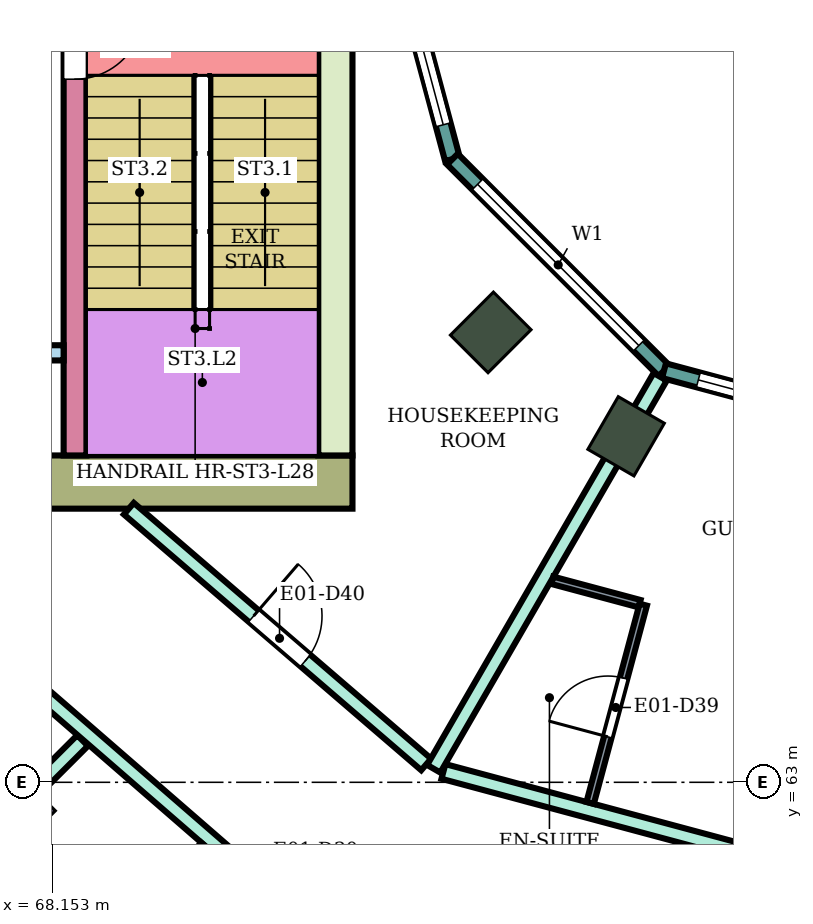
"""IFC4 building model, lengths in metres.
Left out: names, types, materials, properties, quantities, classifications, styles, units other than length and angle.
Written with IfcOpenShell. Run it as: python <this file> out.ifc"""

import sys

from ifc_helpers import new_model, si_unit, direction, frame, frame_2d, origin, origin_2d, place, context, subcontext, project, spatial, rectangle, extrude, element, fill, save


model = new_model("IFC4")
c1 = context("Model", 3, precision=1e-05, world=origin(), true_north=direction((0.0, 1.0)))
c2 = subcontext(c1, "Body", "Model", "MODEL_VIEW")
j1 = project(units=[si_unit("LENGTHUNIT", "METRE"), si_unit("PLANEANGLEUNIT", "RADIAN")], contexts=[c1])
p1 = place(None, origin())
s1 = spatial("IfcSite", under=j1, at=p1, CompositionType="ELEMENT")
p2 = place(p1, origin())
s2 = spatial("IfcBuilding", under=s1, at=p2, CompositionType="ELEMENT")
p3 = place(p2, frame((0.0, 0.0, 122.4)))
s3 = spatial("IfcBuildingStorey", under=s2, at=p3, CompositionType="ELEMENT", Elevation=122.4)
p4 = place(p3, frame((67.555, 62.555, 0.0), z_axis=(0.0, 0.0, 1.0), x_axis=(-0.707106781187, -0.707106781187, 0.0)))
e1 = element("IfcColumn", 1, at=p4, inside=s3, PredefinedType="COLUMN", context=c2, shape_type="SweptSolid", body=[
    extrude(rectangle(XDim=1.0, YDim=0.8, at=origin_2d()), origin(), (0.0, 0.0, 1.0), 3.9),
])
for number, where, z_axis, x_axis in (
    (2, (73.919, 68.919, 0.0), (0.0, 0.0, 1.0), (-0.707, -0.707, 0.0)),
    (3, (75.7, 67.552, 0.0), (0.0, 0.0, 1.0), (-0.5, -0.866, 0.0)),
):
    element("IfcColumn", number, at=place(p3, frame(where, z_axis=z_axis, x_axis=x_axis)), inside=s3, PredefinedType="COLUMN", context=c2, shape_type="SweptSolid", body=[
        extrude(rectangle(XDim=0.8, YDim=0.7, at=origin_2d()), origin(), (0.0, 0.0, 1.0), 3.9),
    ])
p5 = place(p3, frame((72.1, 66.95, 0.0), z_axis=(0.0, 0.0, 1.0), x_axis=(-1.0, 0.0, 0.0)))
e4 = element("IfcWall", 4, at=p5, inside=s3, PredefinedType="SHEAR", context=c2, shape_type="SweptSolid", body=[
    extrude(rectangle(XDim=14.8, YDim=0.7, at=frame_2d((7.4, 0.0))), origin(), (0.0, 0.0, 1.0), 3.58),
])
p6 = place(p5, frame((4.2, 0.0, 0.0)))
e5 = element("IfcOpeningElement", 5, at=p6, cuts=e4, PredefinedType="OPENING", context=c2, shape_type="SweptSolid", body=[
    extrude(rectangle(XDim=2.4, YDim=2.4, at=frame_2d((1.2, 1.2))), frame((0.0, 0.36, 0.0), z_axis=(0.0, -1.0, 0.0), x_axis=(1.0, 0.0, 0.0)), (0.0, 0.0, 1.0), 0.72),
])
p7 = place(p3, frame((71.875, 75.0, 0.0), z_axis=(0.0, 0.0, 1.0), x_axis=(0.0, -1.0, 0.0)))
e6 = element("IfcWall", 6, at=p7, inside=s3, PredefinedType="SHEAR", context=c2, shape_type="SweptSolid", body=[
    extrude(rectangle(XDim=7.7, YDim=0.45, at=frame_2d((3.85, 0.0))), origin(), (0.0, 0.0, 1.0), 3.58),
])
p8 = place(p3, frame((68.45, 75.0, 0.0), z_axis=(0.0, 0.0, 1.0), x_axis=(0.0, -1.0, 0.0)))
e7 = element("IfcWall", 7, at=p8, inside=s3, PredefinedType="SHEAR", context=c2, shape_type="SweptSolid", body=[
    extrude(rectangle(XDim=7.7, YDim=0.3, at=frame_2d((3.85, 0.0))), origin(), (0.0, 0.0, 1.0), 3.58),
])
p9 = place(p8, frame((1.85, 0.0, 0.0)))
e8 = element("IfcOpeningElement", 8, at=p9, cuts=e7, PredefinedType="OPENING", context=c2, shape_type="SweptSolid", body=[
    extrude(rectangle(XDim=0.9, YDim=2.1, at=frame_2d((0.45, 1.05))), frame((0.0, 0.16, 0.0), z_axis=(0.0, -1.0, 0.0), x_axis=(1.0, 0.0, 0.0)), (0.0, 0.0, 1.0), 0.32),
])
p10 = place(p3, frame((68.3, 68.65, 0.0), z_axis=(0.0, 0.0, 1.0), x_axis=(-1.0, 0.0, 0.0)))
e9 = element("IfcWall", 9, at=p10, inside=s3, PredefinedType="SHEAR", context=c2, shape_type="SweptSolid", body=[
    extrude(rectangle(XDim=4.5, YDim=0.2, at=frame_2d((2.25, 0.0))), origin(), (0.0, 0.0, 1.0), 3.58),
])
p11 = place(p3, frame((72.396, 75.0, 0.0), z_axis=(0.0, 0.0, 1.0), x_axis=(0.258789828301, -0.965933654434, 0.0)))
e10 = element("IfcWall", 10, at=p11, inside=s3, PredefinedType="NOTDEFINED", context=c2, shape_type="SweptSolid", body=[
    extrude(rectangle(XDim=3.936, YDim=0.2, at=frame_2d((1.968, 0.0))), origin(), (0.0, 0.0, 1.0), 3.9),
])
p12 = place(p11, frame((0.468, 0.0, 0.9)))
e11 = element("IfcOpeningElement", 11, at=p12, cuts=e10, PredefinedType="OPENING", context=c2, shape_type="SweptSolid", body=[
    extrude(rectangle(XDim=3.0, YDim=2.3, at=frame_2d((1.5, 1.15))), frame((0.0, 0.11, 0.0), z_axis=(0.0, -1.0, 0.0), x_axis=(1.0, 0.0, 0.0)), (0.0, 0.0, 1.0), 0.22),
])
p13 = place(p3, frame((73.415, 71.198, 0.0), z_axis=(0.0, 0.0, 1.0), x_axis=(0.707106781187, -0.707106781187, 0.0)))
e12 = element("IfcWall", 12, at=p13, inside=s3, PredefinedType="NOTDEFINED", context=c2, shape_type="SweptSolid", body=[
    extrude(rectangle(XDim=3.936, YDim=0.2, at=frame_2d((1.968, 0.0))), origin(), (0.0, 0.0, 1.0), 3.9),
])
p14 = place(p13, frame((0.468, 0.0, 0.9)))
e13 = element("IfcOpeningElement", 13, at=p14, cuts=e12, PredefinedType="OPENING", context=c2, shape_type="SweptSolid", body=[
    extrude(rectangle(XDim=3.0, YDim=2.3, at=frame_2d((1.5, 1.15))), frame((0.0, 0.11, 0.0), z_axis=(0.0, -1.0, 0.0), x_axis=(1.0, 0.0, 0.0)), (0.0, 0.0, 1.0), 0.22),
])
p15 = place(p3, frame((76.198, 68.415, 0.0), z_axis=(0.0, 0.0, 1.0), x_axis=(0.965933654434, -0.258789828301, 0.0)))
e14 = element("IfcWall", 14, at=p15, inside=s3, PredefinedType="NOTDEFINED", context=c2, shape_type="SweptSolid", body=[
    extrude(rectangle(XDim=3.936, YDim=0.2, at=frame_2d((1.968, 0.0))), origin(), (0.0, 0.0, 1.0), 3.9),
])
p16 = place(p15, frame((0.468, 0.0, 0.9)))
e15 = element("IfcOpeningElement", 15, at=p16, cuts=e14, PredefinedType="OPENING", context=c2, shape_type="SweptSolid", body=[
    extrude(rectangle(XDim=3.0, YDim=2.3, at=frame_2d((1.5, 1.15))), frame((0.0, 0.11, 0.0), z_axis=(0.0, -1.0, 0.0), x_axis=(1.0, 0.0, 0.0)), (0.0, 0.0, 1.0), 0.22),
])
p17 = place(p3, frame((63.596, 58.596, 0.0), z_axis=(0.0, 0.0, 1.0), x_axis=(0.707106781187, 0.707106781187, 0.0)))
e16 = element("IfcWall", 16, at=p17, inside=s3, PredefinedType="PARTITIONING", context=c2, shape_type="SweptSolid", body=[
    extrude(rectangle(XDim=7.005, YDim=0.2, at=frame_2d((3.503, 0.0))), origin(), (0.0, 0.0, 1.0), 3.45),
])
p18 = place(p3, frame((67.081, 64.971, 0.0), z_axis=(0.0, 0.0, 1.0), x_axis=(0.755031061605, -0.65568902386, 0.0)))
e17 = element("IfcWall", 17, at=p18, inside=s3, PredefinedType="PARTITIONING", context=c2, shape_type="SweptSolid", body=[
    extrude(rectangle(XDim=6.186, YDim=0.2, at=frame_2d((3.093, 0.0))), origin(), (0.0, 0.0, 1.0), 3.45),
])
p19 = place(p18, frame((4.755, 0.0, 0.0)))
e18 = element("IfcOpeningElement", 18, at=p19, cuts=e17, PredefinedType="OPENING", context=c2, shape_type="SweptSolid", body=[
    extrude(rectangle(XDim=1.0, YDim=2.1, at=frame_2d((0.5, 1.05))), frame((0.0, 0.11, 0.0), z_axis=(0.0, -1.0, 0.0), x_axis=(1.0, 0.0, 0.0)), (0.0, 0.0, 1.0), 0.22),
])
p20 = place(p3, frame((69.158, 66.6, 0.0), z_axis=(0.0, 0.0, 1.0), x_axis=(0.758063092745, -0.652181222835, 0.0)))
e19 = element("IfcWall", 19, at=p20, inside=s3, PredefinedType="PARTITIONING", context=c2, shape_type="SweptSolid", body=[
    extrude(rectangle(XDim=5.16, YDim=0.2, at=frame_2d((2.58, 0.0))), origin(), (0.0, 0.0, 1.0), 3.45),
])
p21 = place(p20, frame((2.165, 0.0, 0.0)))
e20 = element("IfcOpeningElement", 20, at=p21, cuts=e19, PredefinedType="OPENING", context=c2, shape_type="SweptSolid", body=[
    extrude(rectangle(XDim=0.9, YDim=2.1, at=frame_2d((0.45, 1.05))), frame((0.0, 0.11, 0.0), z_axis=(0.0, -1.0, 0.0), x_axis=(1.0, 0.0, 0.0)), (0.0, 0.0, 1.0), 0.22),
])
p22 = place(p3, frame((73.297, 63.143, 0.0), z_axis=(0.0, 0.0, 1.0), x_axis=(0.965859030528, -0.25906820173, 0.0)))
e21 = element("IfcWall", 21, at=p22, inside=s3, PredefinedType="PARTITIONING", context=c2, shape_type="SweptSolid", body=[
    extrude(rectangle(XDim=6.81, YDim=0.2, at=frame_2d((3.405, 0.0))), origin(), (0.0, 0.0, 1.0), 3.45),
])
p23 = place(p22, frame((5.39, 0.0, 0.0)))
e22 = element("IfcOpeningElement", 22, at=p23, cuts=e21, PredefinedType="OPENING", context=c2, shape_type="SweptSolid", body=[
    extrude(rectangle(XDim=1.0, YDim=2.1, at=frame_2d((0.5, 1.05))), frame((0.0, 0.11, 0.0), z_axis=(0.0, -1.0, 0.0), x_axis=(1.0, 0.0, 0.0)), (0.0, 0.0, 1.0), 0.22),
])
p24 = place(p3, frame((73.169, 63.178, 0.0), z_axis=(0.0, 0.0, 1.0), x_axis=(0.500239348149, 0.865887171959, 0.0)))
e23 = element("IfcWall", 23, at=p24, inside=s3, PredefinedType="PARTITIONING", context=c2, shape_type="SweptSolid", body=[
    extrude(rectangle(XDim=5.955, YDim=0.2, at=frame_2d((2.978, 0.0))), origin(), (0.0, 0.0, 1.0), 3.45),
])
p25 = place(p3, frame((65.209, 62.875, 0.0), z_axis=(0.0, 0.0, 1.0), x_axis=(0.757930378138, -0.652335451969, 0.0)))
e24 = element("IfcWall", 24, at=p25, inside=s3, PredefinedType="PARTITIONING", context=c2, shape_type="SweptSolid", body=[
    extrude(rectangle(XDim=4.15, YDim=0.1, at=frame_2d((2.075, 0.0))), origin(), (0.0, 0.0, 1.0), 3.45),
])
p26 = place(p3, frame((68.393, 60.135, 0.0), z_axis=(0.0, 0.0, 1.0), x_axis=(0.652061182569, 0.758166349944, 0.0)))
e25 = element("IfcWall", 25, at=p26, inside=s3, PredefinedType="PARTITIONING", context=c2, shape_type="SweptSolid", body=[
    extrude(rectangle(XDim=2.69, YDim=0.1, at=frame_2d((1.345, 0.0))), origin(), (0.0, 0.0, 1.0), 3.45),
])
p27 = place(p26, frame((1.0, 0.0, 0.0)))
e26 = element("IfcOpeningElement", 26, at=p27, cuts=e25, PredefinedType="OPENING", context=c2, shape_type="SweptSolid", body=[
    extrude(rectangle(XDim=0.8, YDim=2.1, at=frame_2d((0.4, 1.05))), frame((0.0, 0.06, 0.0), z_axis=(0.0, -1.0, 0.0), x_axis=(1.0, 0.0, 0.0)), (0.0, 0.0, 1.0), 0.12),
])
p28 = place(p3, frame((74.729, 65.657, 0.0), z_axis=(0.0, 0.0, 1.0), x_axis=(0.965948051503, -0.258736085224, 0.0)))
e27 = element("IfcWall", 27, at=p28, inside=s3, PredefinedType="PARTITIONING", context=c2, shape_type="SweptSolid", body=[
    extrude(rectangle(XDim=1.189, YDim=0.1, at=frame_2d((0.594, 0.0))), origin(), (0.0, 0.0, 1.0), 3.45),
])
p29 = place(p3, frame((75.227, 62.729, 0.0), z_axis=(0.0, 0.0, 1.0), x_axis=(0.258945475746, 0.965891940432, 0.0)))
e28 = element("IfcWall", 28, at=p29, inside=s3, PredefinedType="PARTITIONING", context=c2, shape_type="SweptSolid", body=[
    extrude(rectangle(XDim=2.7, YDim=0.1, at=frame_2d((1.35, 0.0))), origin(), (0.0, 0.0, 1.0), 3.45),
])
p30 = place(p29, frame((0.9, 0.0, 0.0)))
e29 = element("IfcOpeningElement", 29, at=p30, cuts=e28, PredefinedType="OPENING", context=c2, shape_type="SweptSolid", body=[
    extrude(rectangle(XDim=0.8, YDim=2.1, at=frame_2d((0.4, 1.05))), frame((0.0, 0.06, 0.0), z_axis=(0.0, -1.0, 0.0), x_axis=(1.0, 0.0, 0.0)), (0.0, 0.0, 1.0), 0.12),
])
p31 = place(p12, origin())
e30 = element("IfcWindow", 30, at=p31, inside=s3, PartitioningType="SINGLE_PANEL", PredefinedType="WINDOW", context=c2, shape_type="SweptSolid", body=[
    extrude(rectangle(XDim=3.0, YDim=2.3, at=frame_2d((1.5, 1.15))), frame((0.0, 0.03, 0.0), z_axis=(0.0, -1.0, 0.0), x_axis=(1.0, 0.0, 0.0)), (0.0, 0.0, 1.0), 0.06),
])
fill(e11, e30)
p32 = place(p14, origin())
e31 = element("IfcWindow", 31, at=p32, inside=s3, PartitioningType="SINGLE_PANEL", PredefinedType="WINDOW", context=c2, shape_type="SweptSolid", body=[
    extrude(rectangle(XDim=3.0, YDim=2.3, at=frame_2d((1.5, 1.15))), frame((0.0, 0.03, 0.0), z_axis=(0.0, -1.0, 0.0), x_axis=(1.0, 0.0, 0.0)), (0.0, 0.0, 1.0), 0.06),
])
fill(e13, e31)
p33 = place(p16, origin())
e32 = element("IfcWindow", 32, at=p33, inside=s3, PartitioningType="SINGLE_PANEL", PredefinedType="WINDOW", context=c2, shape_type="SweptSolid", body=[
    extrude(rectangle(XDim=3.0, YDim=2.3, at=frame_2d((1.5, 1.15))), frame((0.0, 0.03, 0.0), z_axis=(0.0, -1.0, 0.0), x_axis=(1.0, 0.0, 0.0)), (0.0, 0.0, 1.0), 0.06),
])
fill(e15, e32)
p34 = place(p30, origin())
e33 = element("IfcDoor", 33, at=p34, inside=s3, OperationType="SINGLE_SWING_LEFT", PredefinedType="DOOR", context=c2, shape_type="SweptSolid", body=[
    extrude(rectangle(XDim=0.8, YDim=2.1, at=frame_2d((0.4, 1.05))), frame((0.0, 0.025, 0.0), z_axis=(0.0, -1.0, 0.0), x_axis=(1.0, 0.0, 0.0)), (0.0, 0.0, 1.0), 0.05),
])
fill(e29, e33)
p35 = place(p21, origin())
e34 = element("IfcDoor", 34, at=p35, inside=s3, OperationType="SINGLE_SWING_LEFT", PredefinedType="DOOR", context=c2, shape_type="SweptSolid", body=[
    extrude(rectangle(XDim=0.9, YDim=2.1, at=frame_2d((0.45, 1.05))), frame((0.0, 0.025, 0.0), z_axis=(0.0, -1.0, 0.0), x_axis=(1.0, 0.0, 0.0)), (0.0, 0.0, 1.0), 0.05),
])
fill(e20, e34)
p36 = place(p9, origin())
e35 = element("IfcDoor", 35, at=p36, inside=s3, OperationType="SINGLE_SWING_LEFT", PredefinedType="DOOR", context=c2, shape_type="SweptSolid", body=[
    extrude(rectangle(XDim=0.9, YDim=2.1, at=frame_2d((0.45, 1.05))), frame((0.0, 0.025, 0.0), z_axis=(0.0, -1.0, 0.0), x_axis=(1.0, 0.0, 0.0)), (0.0, 0.0, 1.0), 0.05),
])
fill(e8, e35)
save(model, sys.argv[1])
